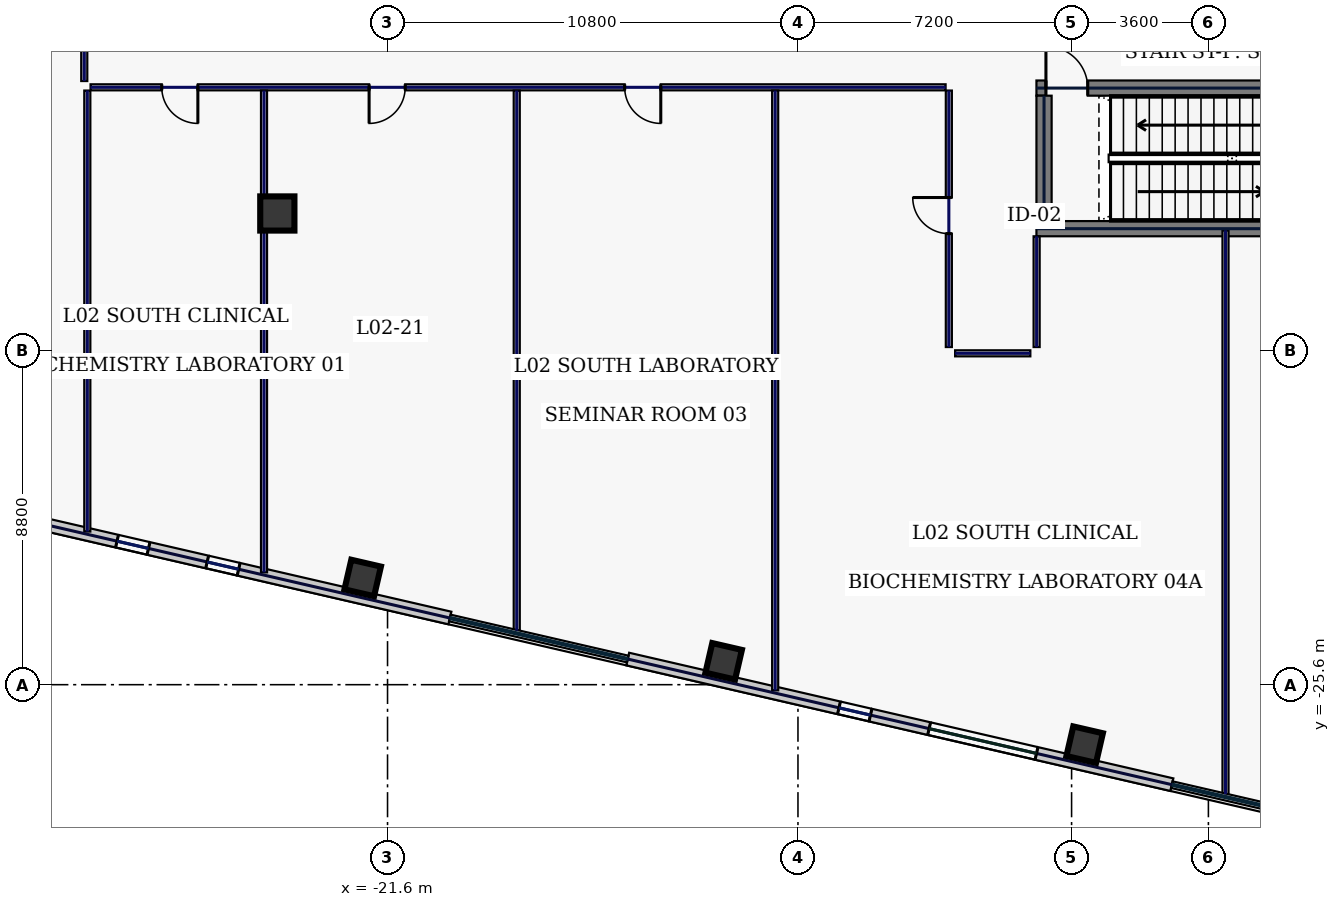
"""IFC4 building model, lengths in metres.
Left out: names, types, materials, properties, quantities, classifications, styles, units other than length and angle.
Written with IfcOpenShell. Run it as: python <this file> out.ifc"""

import sys

from ifc_helpers import new_model, si_unit, direction, frame, frame_2d, origin, origin_2d, place, context, subcontext, project, spatial, rectangle, hollow_rectangle, extrude, element, fill, save


model = new_model("IFC4")
c1 = context("Model", 3, precision=1e-05, world=origin(), true_north=direction((0.0, 1.0)))
c2 = subcontext(c1, "Body", "Model", "MODEL_VIEW")
j1 = project(units=[si_unit("LENGTHUNIT", "METRE"), si_unit("PLANEANGLEUNIT", "RADIAN")], contexts=[c1])
p1 = place(None, origin())
s1 = spatial("IfcSite", under=j1, at=p1, CompositionType="ELEMENT")
p2 = place(p1, origin())
s2 = spatial("IfcBuilding", under=s1, at=p2, CompositionType="ELEMENT")
p3 = place(p2, frame((0.0, 0.0, 13.4)))
s3 = spatial("IfcBuildingStorey", under=s2, at=p3, CompositionType="ELEMENT", Elevation=13.4)
p4 = place(p3, frame((-4.525, -13.6, 0.0), z_axis=(0.0, 0.0, 1.0), x_axis=(1.0, 0.0, 0.0)))
e1 = element("IfcWall", 1, at=p4, inside=s3, PredefinedType="SHEAR", context=c2, shape_type="SweptSolid", body=[
    extrude(rectangle(XDim=9.05, YDim=0.4, at=frame_2d((4.525, 0.0))), origin(), (0.0, 0.0, 1.0), 4.7),
])
p5 = place(p3, frame((-4.525, -9.9, 0.0), z_axis=(0.0, 0.0, 1.0), x_axis=(1.0, 0.0, 0.0)))
e2 = element("IfcWall", 2, at=p5, inside=s3, PredefinedType="SHEAR", context=c2, shape_type="SweptSolid", body=[
    extrude(rectangle(XDim=9.05, YDim=0.4, at=frame_2d((4.525, 0.0))), origin(), (0.0, 0.0, 1.0), 4.7),
])
p6 = place(p5, frame((0.25, 0.0, 0.0)))
e3 = element("IfcOpeningElement", 3, at=p6, cuts=e2, PredefinedType="OPENING", context=c2, shape_type="SweptSolid", body=[
    extrude(rectangle(XDim=1.1, YDim=2.2, at=frame_2d((0.55, 1.1))), frame((0.0, 0.21, 0.0), z_axis=(0.0, -1.0, 0.0), x_axis=(1.0, 0.0, 0.0)), (0.0, 0.0, 1.0), 0.42),
])
p7 = place(p3, frame((-4.325, -13.4, 0.0), z_axis=(0.0, 0.0, 1.0), x_axis=(0.0, 1.0, 0.0)))
e4 = element("IfcWall", 4, at=p7, inside=s3, PredefinedType="SHEAR", context=c2, shape_type="SweptSolid", body=[
    extrude(rectangle(XDim=3.3, YDim=0.4, at=frame_2d((1.65, 0.0))), origin(), (0.0, 0.0, 1.0), 4.7),
])
p8 = place(p3, frame((-24.5, -13.2, 0.0), z_axis=(0.0, 0.0, 1.0), x_axis=(1.0, 0.0, 0.0)))
e5 = element("IfcColumn", 5, at=p8, inside=s3, PredefinedType="COLUMN", context=c2, shape_type="SweptSolid", body=[
    extrude(hollow_rectangle(XDim=0.9, YDim=0.9, WallThickness=0.04, at=origin_2d()), origin(), (0.0, 0.0, 1.0), 4.7),
])
for number, where, z_axis, x_axis in (
    (6, (-22.254, -22.792, 0.0), (0.0, 0.0, 1.0), (0.974, -0.225, 0.0)),
    (7, (-12.755, -24.985, 0.0), (0.0, 0.0, 1.0), (0.974, -0.225, 0.0)),
    (8, (-3.256, -27.178, 0.0), (0.0, 0.0, 1.0), (0.974, -0.225, 0.0)),
):
    element("IfcColumn", number, at=place(p3, frame(where, z_axis=z_axis, x_axis=x_axis)), inside=s3, PredefinedType="COLUMN", context=c2, shape_type="SweptSolid", body=[
        extrude(hollow_rectangle(XDim=0.8, YDim=0.8, WallThickness=0.036, at=origin_2d()), origin(), (0.0, 0.0, 1.0), 4.7),
    ])
p9 = place(p3, frame((-42.029, -18.75, 0.0), z_axis=(0.0, 0.0, 1.0), x_axis=(0.97436993772, -0.224951604723, 0.0)))
e9 = element("IfcWall", 9, at=p9, inside=s3, PredefinedType="STANDARD", context=c2, shape_type="SweptSolid", body=[
    extrude(rectangle(XDim=22.651, YDim=0.34, at=frame_2d((11.326, 0.0))), origin(), (0.0, 0.0, 1.0), 4.7),
])
p10 = place(p9, frame((1.862, 0.0, 0.85)))
e10 = element("IfcOpeningElement", 10, at=p10, cuts=e9, PredefinedType="OPENING", context=c2, shape_type="SweptSolid", body=[
    extrude(rectangle(XDim=2.9, YDim=2.3, at=frame_2d((1.45, 1.15))), frame((0.0, 0.18, 0.0), z_axis=(0.0, -1.0, 0.0), x_axis=(1.0, 0.0, 0.0)), (0.0, 0.0, 1.0), 0.36),
])
p11 = place(p9, frame((6.346, 0.0, 0.85)))
e11 = element("IfcOpeningElement", 11, at=p11, cuts=e9, PredefinedType="OPENING", context=c2, shape_type="SweptSolid", body=[
    extrude(rectangle(XDim=2.9, YDim=2.3, at=frame_2d((1.45, 1.15))), frame((0.0, 0.18, 0.0), z_axis=(0.0, -1.0, 0.0), x_axis=(1.0, 0.0, 0.0)), (0.0, 0.0, 1.0), 0.36),
])
p12 = place(p9, frame((13.661, 0.0, 0.85)))
e12 = element("IfcOpeningElement", 12, at=p12, cuts=e9, PredefinedType="OPENING", context=c2, shape_type="SweptSolid", body=[
    extrude(rectangle(XDim=0.85, YDim=1.85, at=frame_2d((0.425, 0.925))), frame((0.0, 0.18, 0.0), z_axis=(0.0, -1.0, 0.0), x_axis=(1.0, 0.0, 0.0)), (0.0, 0.0, 1.0), 0.36),
])
p13 = place(p9, frame((16.095, 0.0, 0.85)))
e13 = element("IfcOpeningElement", 13, at=p13, cuts=e9, PredefinedType="OPENING", context=c2, shape_type="SweptSolid", body=[
    extrude(rectangle(XDim=0.85, YDim=1.85, at=frame_2d((0.425, 0.925))), frame((0.0, 0.18, 0.0), z_axis=(0.0, -1.0, 0.0), x_axis=(1.0, 0.0, 0.0)), (0.0, 0.0, 1.0), 0.36),
])
p14 = place(p3, frame((-15.281, -24.925, 0.0), z_axis=(0.0, 0.0, 1.0), x_axis=(0.974370193991, -0.22495049469, 0.0)))
e14 = element("IfcWall", 14, at=p14, inside=s3, PredefinedType="STANDARD", context=c2, shape_type="SweptSolid", body=[
    extrude(rectangle(XDim=14.697, YDim=0.34, at=frame_2d((7.349, 0.0))), origin(), (0.0, 0.0, 1.0), 4.7),
])
p15 = place(p14, frame((5.706, 0.0, 0.85)))
e15 = element("IfcOpeningElement", 15, at=p15, cuts=e14, PredefinedType="OPENING", context=c2, shape_type="SweptSolid", body=[
    extrude(rectangle(XDim=0.85, YDim=1.85, at=frame_2d((0.425, 0.925))), frame((0.0, 0.18, 0.0), z_axis=(0.0, -1.0, 0.0), x_axis=(1.0, 0.0, 0.0)), (0.0, 0.0, 1.0), 0.36),
])
p16 = place(p14, frame((8.141, 0.0, 0.85)))
e16 = element("IfcOpeningElement", 16, at=p16, cuts=e14, PredefinedType="OPENING", context=c2, shape_type="SweptSolid", body=[
    extrude(rectangle(XDim=2.9, YDim=2.3, at=frame_2d((1.45, 1.15))), frame((0.0, 0.18, 0.0), z_axis=(0.0, -1.0, 0.0), x_axis=(1.0, 0.0, 0.0)), (0.0, 0.0, 1.0), 0.36),
])
p17 = place(p3, frame((-29.58, -9.715, 0.0), z_axis=(0.0, 0.0, 1.0), x_axis=(0.0, 1.0, 0.0)))
e17 = element("IfcWall", 17, at=p17, inside=s3, PredefinedType="PARTITIONING", context=c2, shape_type="SweptSolid", body=[
    extrude(rectangle(XDim=19.43, YDim=0.16, at=frame_2d((9.715, 0.0))), origin(), (0.0, 0.0, 1.0), 4.7),
])
p18 = place(p17, frame((2.019, 0.0, 0.0)))
e18 = element("IfcOpeningElement", 18, at=p18, cuts=e17, PredefinedType="OPENING", context=c2, shape_type="SweptSolid", body=[
    extrude(rectangle(XDim=0.95, YDim=2.2, at=frame_2d((0.475, 1.1))), frame((0.0, 0.09, 0.0), z_axis=(0.0, -1.0, 0.0), x_axis=(1.0, 0.0, 0.0)), (0.0, 0.0, 1.0), 0.18),
])
p19 = place(p17, frame((6.725, 0.0, 0.0)))
e19 = element("IfcOpeningElement", 19, at=p19, cuts=e17, PredefinedType="OPENING", context=c2, shape_type="SweptSolid", body=[
    extrude(rectangle(XDim=0.95, YDim=2.2, at=frame_2d((0.475, 1.1))), frame((0.0, 0.09, 0.0), z_axis=(0.0, -1.0, 0.0), x_axis=(1.0, 0.0, 0.0)), (0.0, 0.0, 1.0), 0.18),
])
p20 = place(p17, frame((11.925, 0.0, 0.0)))
e20 = element("IfcOpeningElement", 20, at=p20, cuts=e17, PredefinedType="OPENING", context=c2, shape_type="SweptSolid", body=[
    extrude(rectangle(XDim=0.95, YDim=2.2, at=frame_2d((0.475, 1.1))), frame((0.0, 0.09, 0.0), z_axis=(0.0, -1.0, 0.0), x_axis=(1.0, 0.0, 0.0)), (0.0, 0.0, 1.0), 0.18),
])
p21 = place(p17, frame((16.631, 0.0, 0.0)))
e21 = element("IfcOpeningElement", 21, at=p21, cuts=e17, PredefinedType="OPENING", context=c2, shape_type="SweptSolid", body=[
    extrude(rectangle(XDim=0.95, YDim=2.2, at=frame_2d((0.475, 1.1))), frame((0.0, 0.09, 0.0), z_axis=(0.0, -1.0, 0.0), x_axis=(1.0, 0.0, 0.0)), (0.0, 0.0, 1.0), 0.18),
])
p22 = place(p3, frame((-4.52, -13.8, 0.0), z_axis=(0.0, 0.0, 1.0), x_axis=(0.0, -1.0, 0.0)))
e22 = element("IfcWall", 22, at=p22, inside=s3, PredefinedType="PARTITIONING", context=c2, shape_type="SweptSolid", body=[
    extrude(rectangle(XDim=2.915, YDim=0.16, at=frame_2d((1.458, 0.0))), origin(), (0.0, 0.0, 1.0), 4.7),
])
p23 = place(p3, frame((-4.685, -16.88, 0.0), z_axis=(0.0, 0.0, 1.0), x_axis=(-1.0, 0.0, 0.0)))
e23 = element("IfcWall", 23, at=p23, inside=s3, PredefinedType="PARTITIONING", context=c2, shape_type="SweptSolid", body=[
    extrude(rectangle(XDim=1.98, YDim=0.16, at=frame_2d((0.99, 0.0))), origin(), (0.0, 0.0, 1.0), 4.7),
])
p24 = place(p3, frame((-6.83, -16.715, 0.0), z_axis=(0.0, 0.0, 1.0), x_axis=(0.0, 1.0, 0.0)))
e24 = element("IfcWall", 24, at=p24, inside=s3, PredefinedType="PARTITIONING", context=c2, shape_type="SweptSolid", body=[
    extrude(rectangle(XDim=6.75, YDim=0.16, at=frame_2d((3.375, 0.0))), origin(), (0.0, 0.0, 1.0), 4.7),
])
p25 = place(p24, frame((2.985, 0.0, 0.0)))
e25 = element("IfcOpeningElement", 25, at=p25, cuts=e24, PredefinedType="OPENING", context=c2, shape_type="SweptSolid", body=[
    extrude(rectangle(XDim=0.95, YDim=2.2, at=frame_2d((0.475, 1.1))), frame((0.0, 0.09, 0.0), z_axis=(0.0, -1.0, 0.0), x_axis=(1.0, 0.0, 0.0)), (0.0, 0.0, 1.0), 0.18),
])
p26 = place(p3, frame((-6.915, -9.88, 0.0), z_axis=(0.0, 0.0, 1.0), x_axis=(-1.0, 0.0, 0.0)))
e26 = element("IfcWall", 26, at=p26, inside=s3, PredefinedType="PARTITIONING", context=c2, shape_type="SweptSolid", body=[
    extrude(rectangle(XDim=22.5, YDim=0.16, at=frame_2d((11.25, 0.0))), origin(), (0.0, 0.0, 1.0), 4.7),
])
p27 = place(p26, frame((19.676, 0.0, 0.0)))
e27 = element("IfcOpeningElement", 27, at=p27, cuts=e26, PredefinedType="OPENING", context=c2, shape_type="SweptSolid", body=[
    extrude(rectangle(XDim=0.95, YDim=2.2, at=frame_2d((0.475, 1.1))), frame((0.0, 0.09, 0.0), z_axis=(0.0, -1.0, 0.0), x_axis=(1.0, 0.0, 0.0)), (0.0, 0.0, 1.0), 0.18),
])
p28 = place(p26, frame((14.22, 0.0, 0.0)))
e28 = element("IfcOpeningElement", 28, at=p28, cuts=e26, PredefinedType="OPENING", context=c2, shape_type="SweptSolid", body=[
    extrude(rectangle(XDim=0.95, YDim=2.2, at=frame_2d((0.475, 1.1))), frame((0.0, 0.09, 0.0), z_axis=(0.0, -1.0, 0.0), x_axis=(1.0, 0.0, 0.0)), (0.0, 0.0, 1.0), 0.18),
])
p29 = place(p26, frame((7.495, 0.0, 0.0)))
e29 = element("IfcOpeningElement", 29, at=p29, cuts=e26, PredefinedType="OPENING", context=c2, shape_type="SweptSolid", body=[
    extrude(rectangle(XDim=0.95, YDim=2.2, at=frame_2d((0.475, 1.1))), frame((0.0, 0.09, 0.0), z_axis=(0.0, -1.0, 0.0), x_axis=(1.0, 0.0, 0.0)), (0.0, 0.0, 1.0), 0.18),
])
p30 = place(p3, frame((-29.5, -21.571, 0.0), z_axis=(0.0, 0.0, 1.0), x_axis=(0.0, 1.0, 0.0)))
e30 = element("IfcWall", 30, at=p30, inside=s3, PredefinedType="PARTITIONING", context=c2, shape_type="SweptSolid", body=[
    extrude(rectangle(XDim=11.605, YDim=0.16, at=frame_2d((5.803, 0.0))), origin(), (0.0, 0.0, 1.0), 4.7),
])
p31 = place(p3, frame((-24.85, -22.644, 0.0), z_axis=(0.0, 0.0, 1.0), x_axis=(0.0, 1.0, 0.0)))
e31 = element("IfcWall", 31, at=p31, inside=s3, PredefinedType="PARTITIONING", context=c2, shape_type="SweptSolid", body=[
    extrude(rectangle(XDim=12.679, YDim=0.16, at=frame_2d((6.339, 0.0))), origin(), (0.0, 0.0, 1.0), 4.7),
])
p32 = place(p3, frame((-18.2, -24.179, 0.0), z_axis=(0.0, 0.0, 1.0), x_axis=(0.0, 1.0, 0.0)))
e32 = element("IfcWall", 32, at=p32, inside=s3, PredefinedType="PARTITIONING", context=c2, shape_type="SweptSolid", body=[
    extrude(rectangle(XDim=14.214, YDim=0.16, at=frame_2d((7.107, 0.0))), origin(), (0.0, 0.0, 1.0), 4.7),
])
p33 = place(p3, frame((-11.4, -25.749, 0.0), z_axis=(0.0, 0.0, 1.0), x_axis=(0.0, 1.0, 0.0)))
e33 = element("IfcWall", 33, at=p33, inside=s3, PredefinedType="PARTITIONING", context=c2, shape_type="SweptSolid", body=[
    extrude(rectangle(XDim=15.784, YDim=0.16, at=frame_2d((7.892, 0.0))), origin(), (0.0, 0.0, 1.0), 4.7),
])
p34 = place(p3, frame((0.45, -28.485, 0.0), z_axis=(0.0, 0.0, 1.0), x_axis=(0.0, 1.0, 0.0)))
e34 = element("IfcWall", 34, at=p34, inside=s3, PredefinedType="PARTITIONING", context=c2, shape_type="SweptSolid", body=[
    extrude(rectangle(XDim=14.845, YDim=0.16, at=frame_2d((7.423, 0.0))), origin(), (0.0, 0.0, 1.0), 4.7),
])
p35 = place(p12, origin())
e35 = element("IfcWindow", 35, at=p35, inside=s3, PartitioningType="SINGLE_PANEL", PredefinedType="WINDOW", context=c2, shape_type="SweptSolid", body=[
    extrude(rectangle(XDim=0.85, YDim=1.85, at=frame_2d((0.425, 0.925))), frame((0.0, 0.03, 0.0), z_axis=(0.0, -1.0, 0.0), x_axis=(1.0, 0.0, 0.0)), (0.0, 0.0, 1.0), 0.06),
])
fill(e12, e35)
p36 = place(p13, origin())
e36 = element("IfcWindow", 36, at=p36, inside=s3, PartitioningType="SINGLE_PANEL", PredefinedType="WINDOW", context=c2, shape_type="SweptSolid", body=[
    extrude(rectangle(XDim=0.85, YDim=1.85, at=frame_2d((0.425, 0.925))), frame((0.0, 0.03, 0.0), z_axis=(0.0, -1.0, 0.0), x_axis=(1.0, 0.0, 0.0)), (0.0, 0.0, 1.0), 0.06),
])
fill(e13, e36)
p37 = place(p15, origin())
e37 = element("IfcWindow", 37, at=p37, inside=s3, PartitioningType="SINGLE_PANEL", PredefinedType="WINDOW", context=c2, shape_type="SweptSolid", body=[
    extrude(rectangle(XDim=0.85, YDim=1.85, at=frame_2d((0.425, 0.925))), frame((0.0, 0.03, 0.0), z_axis=(0.0, -1.0, 0.0), x_axis=(1.0, 0.0, 0.0)), (0.0, 0.0, 1.0), 0.06),
])
fill(e15, e37)
p38 = place(p16, origin())
e38 = element("IfcWindow", 38, at=p38, inside=s3, PartitioningType="SINGLE_PANEL", PredefinedType="WINDOW", context=c2, shape_type="SweptSolid", body=[
    extrude(rectangle(XDim=2.9, YDim=2.3, at=frame_2d((1.45, 1.15))), frame((0.0, 0.03, 0.0), z_axis=(0.0, -1.0, 0.0), x_axis=(1.0, 0.0, 0.0)), (0.0, 0.0, 1.0), 0.06),
])
fill(e16, e38)
p39 = place(p6, origin())
e39 = element("IfcDoor", 39, at=p39, inside=s3, OperationType="SINGLE_SWING_LEFT", PredefinedType="DOOR", context=c2, shape_type="SweptSolid", body=[
    extrude(rectangle(XDim=1.1, YDim=2.2, at=frame_2d((0.55, 1.1))), frame((0.0, 0.025, 0.0), z_axis=(0.0, -1.0, 0.0), x_axis=(1.0, 0.0, 0.0)), (0.0, 0.0, 1.0), 0.05),
])
fill(e3, e39)
p40 = place(p27, origin())
e40 = element("IfcDoor", 40, at=p40, inside=s3, OperationType="SINGLE_SWING_LEFT", PredefinedType="DOOR", context=c2, shape_type="SweptSolid", body=[
    extrude(rectangle(XDim=0.95, YDim=2.2, at=frame_2d((0.475, 1.1))), frame((0.0, 0.025, 0.0), z_axis=(0.0, -1.0, 0.0), x_axis=(1.0, 0.0, 0.0)), (0.0, 0.0, 1.0), 0.05),
])
fill(e27, e40)
p41 = place(p28, origin())
e41 = element("IfcDoor", 41, at=p41, inside=s3, OperationType="SINGLE_SWING_RIGHT", PredefinedType="DOOR", context=c2, shape_type="SweptSolid", body=[
    extrude(rectangle(XDim=0.95, YDim=2.2, at=frame_2d((0.475, 1.1))), frame((0.0, 0.025, 0.0), z_axis=(0.0, -1.0, 0.0), x_axis=(1.0, 0.0, 0.0)), (0.0, 0.0, 1.0), 0.05),
])
fill(e28, e41)
p42 = place(p29, origin())
e42 = element("IfcDoor", 42, at=p42, inside=s3, OperationType="SINGLE_SWING_LEFT", PredefinedType="DOOR", context=c2, shape_type="SweptSolid", body=[
    extrude(rectangle(XDim=0.95, YDim=2.2, at=frame_2d((0.475, 1.1))), frame((0.0, 0.025, 0.0), z_axis=(0.0, -1.0, 0.0), x_axis=(1.0, 0.0, 0.0)), (0.0, 0.0, 1.0), 0.05),
])
fill(e29, e42)
p43 = place(p25, origin())
e43 = element("IfcDoor", 43, at=p43, inside=s3, OperationType="SINGLE_SWING_RIGHT", PredefinedType="DOOR", context=c2, shape_type="SweptSolid", body=[
    extrude(rectangle(XDim=0.95, YDim=2.2, at=frame_2d((0.475, 1.1))), frame((0.0, 0.025, 0.0), z_axis=(0.0, -1.0, 0.0), x_axis=(1.0, 0.0, 0.0)), (0.0, 0.0, 1.0), 0.05),
])
fill(e25, e43)
save(model, sys.argv[1])
